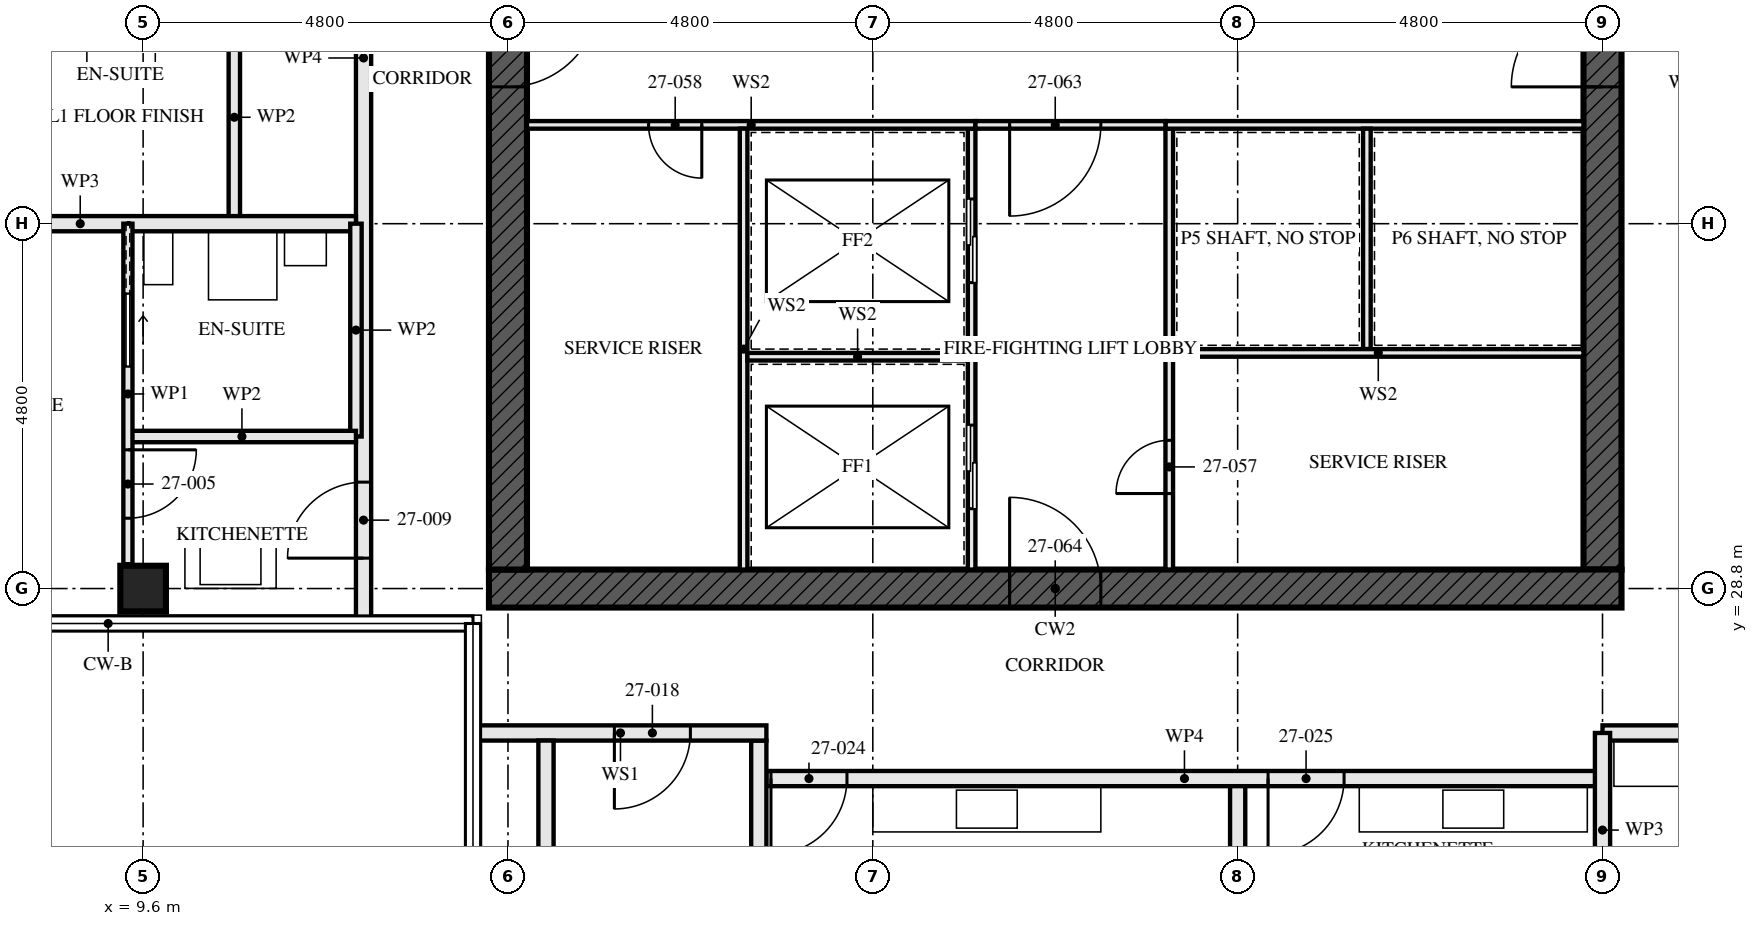
"""IFC4 building model, lengths in metres.
Left out: names, types, materials, properties, quantities, classifications, styles, units other than length and angle.
Written with IfcOpenShell. Run it as: python <this file> out.ifc"""

import sys

from ifc_helpers import new_model, si_unit, direction, frame, frame_2d, origin, origin_2d, place, context, subcontext, project, spatial, rectangle, hollow_rectangle, extrude, element, fill, save


model = new_model("IFC4")
c1 = context("Model", 3, precision=1e-05, world=origin(), true_north=direction((0.0, 1.0)))
c2 = subcontext(c1, "Body", "Model", "MODEL_VIEW")
j1 = project(units=[si_unit("LENGTHUNIT", "METRE"), si_unit("PLANEANGLEUNIT", "RADIAN")], contexts=[c1])
p1 = place(None, origin())
s1 = spatial("IfcSite", under=j1, at=p1, CompositionType="ELEMENT")
p2 = place(p1, origin())
s2 = spatial("IfcBuilding", under=s1, at=p2, CompositionType="ELEMENT")
p3 = place(p2, frame((0.0, 0.0, 101.5)))
s3 = spatial("IfcBuildingStorey", under=s2, at=p3, CompositionType="ELEMENT", Elevation=101.5)
p4 = place(p3, frame((9.6, 28.8, 0.0), z_axis=(0.0, 0.0, 1.0), x_axis=(0.0, 1.0, 0.0)))
e1 = element("IfcColumn", 1, at=p4, inside=s3, PredefinedType="COLUMN", context=c2, shape_type="SweptSolid", body=[
    extrude(hollow_rectangle(XDim=0.6, YDim=0.6, WallThickness=0.08, at=origin_2d()), origin(), (0.0, 0.0, 1.0), 3.5),
])
p5 = place(p3, frame((14.15, 28.8, -0.17), z_axis=(0.0, 0.0, 1.0), x_axis=(1.0, 0.0, 0.0)))
e2 = element("IfcWall", 2, at=p5, inside=s3, PredefinedType="SHEAR", context=c2, shape_type="SweptSolid", body=[
    extrude(rectangle(XDim=14.9, YDim=0.5, at=frame_2d((7.45, 0.0))), origin(), (0.0, 0.0, 1.0), 3.5),
])
p6 = place(p5, frame((6.85, 0.0, 0.17)))
e3 = element("IfcOpeningElement", 3, at=p6, cuts=e2, PredefinedType="OPENING", context=c2, shape_type="SweptSolid", body=[
    extrude(rectangle(XDim=1.2, YDim=2.1, at=frame_2d((0.6, 1.05))), frame((0.0, 0.26, 0.0), z_axis=(0.0, -1.0, 0.0), x_axis=(1.0, 0.0, 0.0)), (0.0, 0.0, 1.0), 0.521),
])
p7 = place(p3, frame((14.4, 42.95, -0.17), z_axis=(0.0, 0.0, 1.0), x_axis=(0.0, -1.0, 0.0)))
e4 = element("IfcWall", 4, at=p7, inside=s3, PredefinedType="SHEAR", context=c2, shape_type="SweptSolid", body=[
    extrude(rectangle(XDim=13.9, YDim=0.5, at=frame_2d((6.95, 0.0))), origin(), (0.0, 0.0, 1.0), 3.5),
])
p8 = place(p7, frame((6.35, 0.0, 0.17)))
e5 = element("IfcOpeningElement", 5, at=p8, cuts=e4, PredefinedType="OPENING", context=c2, shape_type="SweptSolid", body=[
    extrude(rectangle(XDim=1.2, YDim=2.1, at=frame_2d((0.6, 1.05))), frame((0.0, 0.26, 0.0), z_axis=(0.0, -1.0, 0.0), x_axis=(1.0, 0.0, 0.0)), (0.0, 0.0, 1.0), 0.521),
])
p9 = place(p3, frame((28.8, 29.05, -0.17), z_axis=(0.0, 0.0, 1.0), x_axis=(0.0, 1.0, 0.0)))
e6 = element("IfcWall", 6, at=p9, inside=s3, PredefinedType="SHEAR", context=c2, shape_type="SweptSolid", body=[
    extrude(rectangle(XDim=13.9, YDim=0.5, at=frame_2d((6.95, 0.0))), origin(), (0.0, 0.0, 1.0), 3.5),
])
p10 = place(p9, frame((6.35, 0.0, 0.17)))
e7 = element("IfcOpeningElement", 7, at=p10, cuts=e6, PredefinedType="OPENING", context=c2, shape_type="SweptSolid", body=[
    extrude(rectangle(XDim=1.2, YDim=2.1, at=frame_2d((0.6, 1.05))), frame((0.0, 0.26, 0.0), z_axis=(0.0, -1.0, 0.0), x_axis=(1.0, 0.0, 0.0)), (0.0, 0.0, 1.0), 0.521),
])
p11 = place(p3, frame((10.8, 36.4, 0.0), z_axis=(0.0, 0.0, 1.0), x_axis=(0.0, -1.0, 0.0)))
e8 = element("IfcWall", 8, at=p11, inside=s3, PredefinedType="PARTITIONING", context=c2, shape_type="SweptSolid", body=[
    extrude(rectangle(XDim=2.8, YDim=0.15, at=frame_2d((1.4, 0.0))), origin(), (0.0, 0.0, 1.0), 3.33),
])
p12 = place(p3, frame((5.145, 33.6, 0.0), z_axis=(0.0, 0.0, 1.0), x_axis=(1.0, 0.0, 0.0)))
e9 = element("IfcWall", 9, at=p12, inside=s3, PredefinedType="PARTITIONING", context=c2, shape_type="SweptSolid", body=[
    extrude(rectangle(XDim=7.255, YDim=0.2, at=frame_2d((3.627, 0.0))), origin(), (0.0, 0.0, 1.0), 2.55),
])
p13 = place(p3, frame((9.4, 30.8, 0.0), z_axis=(0.0, 0.0, 1.0), x_axis=(1.0, 0.0, 0.0)))
e10 = element("IfcWall", 10, at=p13, inside=s3, PredefinedType="PARTITIONING", context=c2, shape_type="SweptSolid", body=[
    extrude(rectangle(XDim=3.0, YDim=0.15, at=frame_2d((1.5, 0.0))), origin(), (0.0, 0.0, 1.0), 3.33),
])
p14 = place(p3, frame((12.4, 33.6, 0.0), z_axis=(0.0, 0.0, 1.0), x_axis=(0.0, -1.0, 0.0)))
e11 = element("IfcWall", 11, at=p14, inside=s3, PredefinedType="PARTITIONING", context=c2, shape_type="SweptSolid", body=[
    extrude(rectangle(XDim=2.8, YDim=0.15, at=frame_2d((1.4, 0.0))), origin(), (0.0, 0.0, 1.0), 3.33),
])
p15 = place(p3, frame((9.4, 33.6, 0.0), z_axis=(0.0, 0.0, 1.0), x_axis=(0.0, -1.0, 0.0)))
e12 = element("IfcWall", 12, at=p15, inside=s3, PredefinedType="PARTITIONING", context=c2, shape_type="SweptSolid", body=[
    extrude(rectangle(XDim=4.48, YDim=0.12, at=frame_2d((2.24, 0.0))), origin(), (0.0, 0.0, 1.0), 3.33),
])
p16 = place(p15, frame((2.975, 0.0, 0.0)))
e13 = element("IfcOpeningElement", 13, at=p16, cuts=e12, PredefinedType="OPENING", context=c2, shape_type="SweptSolid", body=[
    extrude(rectangle(XDim=0.9, YDim=2.1, at=frame_2d((0.45, 1.05))), frame((0.0, 0.071, 0.0), z_axis=(0.0, -1.0, 0.0), x_axis=(1.0, 0.0, 0.0)), (0.0, 0.0, 1.0), 0.141),
])
p17 = place(p15, frame((0.925, 0.0, 0.0)))
e14 = element("IfcOpeningElement", 14, at=p17, cuts=e12, PredefinedType="OPENING", context=c2, shape_type="SweptSolid", body=[
    extrude(rectangle(XDim=0.95, YDim=2.1, at=frame_2d((0.475, 1.05))), frame((0.0, 0.071, 0.0), z_axis=(0.0, -1.0, 0.0), x_axis=(1.0, 0.0, 0.0)), (0.0, 0.0, 1.0), 0.141),
])
p18 = place(p3, frame((12.5, 43.2, 0.0), z_axis=(0.0, 0.0, 1.0), x_axis=(0.0, -1.0, 0.0)))
e15 = element("IfcWall", 15, at=p18, inside=s3, PredefinedType="PARTITIONING", context=c2, shape_type="SweptSolid", body=[
    extrude(rectangle(XDim=14.84, YDim=0.2, at=frame_2d((7.42, 0.0))), origin(), (0.0, 0.0, 1.0), 2.32),
])
p19 = place(p18, frame((1.4, 0.0, 0.0)))
e16 = element("IfcOpeningElement", 16, at=p19, cuts=e15, PredefinedType="OPENING", context=c2, shape_type="SweptSolid", body=[
    extrude(rectangle(XDim=1.0, YDim=2.1, at=frame_2d((0.5, 1.05))), frame((0.0, 0.111, 0.0), z_axis=(0.0, -1.0, 0.0), x_axis=(1.0, 0.0, 0.0)), (0.0, 0.0, 1.0), 0.221),
])
p20 = place(p18, frame((5.2, 0.0, 0.0)))
e17 = element("IfcOpeningElement", 17, at=p20, cuts=e15, PredefinedType="OPENING", context=c2, shape_type="SweptSolid", body=[
    extrude(rectangle(XDim=1.0, YDim=2.1, at=frame_2d((0.5, 1.05))), frame((0.0, 0.111, 0.0), z_axis=(0.0, -1.0, 0.0), x_axis=(1.0, 0.0, 0.0)), (0.0, 0.0, 1.0), 0.221),
])
p21 = place(p18, frame((13.0, 0.0, 0.0)))
e18 = element("IfcOpeningElement", 18, at=p21, cuts=e15, PredefinedType="OPENING", context=c2, shape_type="SweptSolid", body=[
    extrude(rectangle(XDim=1.0, YDim=2.1, at=frame_2d((0.5, 1.05))), frame((0.0, 0.111, 0.0), z_axis=(0.0, -1.0, 0.0), x_axis=(1.0, 0.0, 0.0)), (0.0, 0.0, 1.0), 0.221),
])
for number, where, z_axis, x_axis in (
    (19, (14.9, 22.1, 0.0), (0.0, 0.0, 1.0), (0.0, 1.0, 0.0)),
    (20, (17.7, 22.1, 0.0), (0.0, 0.0, 1.0), (0.0, 1.0, 0.0)),
):
    element("IfcWall", number, at=place(p3, frame(where, z_axis=z_axis, x_axis=x_axis)), inside=s3, PredefinedType="SOLIDWALL", context=c2, shape_type="SweptSolid", body=[
        extrude(rectangle(XDim=4.7, YDim=0.2, at=frame_2d((2.35, 0.0))), origin(), (0.0, 0.0, 1.0), 2.99),
    ])
p22 = place(p3, frame((13.96, 26.9, 0.0), z_axis=(0.0, 0.0, 1.0), x_axis=(1.0, 0.0, 0.0)))
e21 = element("IfcWall", 21, at=p22, inside=s3, PredefinedType="SOLIDWALL", context=c2, shape_type="SweptSolid", body=[
    extrude(rectangle(XDim=3.84, YDim=0.2, at=frame_2d((1.92, 0.0))), origin(), (0.0, 0.0, 1.0), 2.32),
])
p23 = place(p22, frame((1.84, 0.0, 0.0)))
e22 = element("IfcOpeningElement", 22, at=p23, cuts=e21, PredefinedType="OPENING", context=c2, shape_type="SweptSolid", body=[
    extrude(rectangle(XDim=1.0, YDim=2.1, at=frame_2d((0.5, 1.05))), frame((0.0, 0.111, 0.0), z_axis=(0.0, -1.0, 0.0), x_axis=(1.0, 0.0, 0.0)), (0.0, 0.0, 1.0), 0.221),
])
p24 = place(p3, frame((24.0, 14.745, 0.0), z_axis=(0.0, 0.0, 1.0), x_axis=(0.0, 1.0, 0.0)))
e23 = element("IfcWall", 23, at=p24, inside=s3, PredefinedType="PARTITIONING", context=c2, shape_type="SweptSolid", body=[
    extrude(rectangle(XDim=11.455, YDim=0.2, at=frame_2d((5.728, 0.0))), origin(), (0.0, 0.0, 1.0), 2.55),
])
p25 = place(p3, frame((17.8, 26.3, 0.0), z_axis=(0.0, 0.0, 1.0), x_axis=(1.0, 0.0, 0.0)))
e24 = element("IfcWall", 24, at=p25, inside=s3, PredefinedType="PARTITIONING", context=c2, shape_type="SweptSolid", body=[
    extrude(rectangle(XDim=11.0, YDim=0.2, at=frame_2d((5.5, 0.0))), origin(), (0.0, 0.0, 1.0), 2.55),
])
p26 = place(p25, frame((0.06, 0.0, 0.0)))
e25 = element("IfcOpeningElement", 25, at=p26, cuts=e24, PredefinedType="OPENING", context=c2, shape_type="SweptSolid", body=[
    extrude(rectangle(XDim=1.0, YDim=2.1, at=frame_2d((0.5, 1.05))), frame((0.0, 0.111, 0.0), z_axis=(0.0, -1.0, 0.0), x_axis=(1.0, 0.0, 0.0)), (0.0, 0.0, 1.0), 0.221),
])
p27 = place(p25, frame((6.6, 0.0, 0.0)))
e26 = element("IfcOpeningElement", 26, at=p27, cuts=e24, PredefinedType="OPENING", context=c2, shape_type="SweptSolid", body=[
    extrude(rectangle(XDim=1.0, YDim=2.1, at=frame_2d((0.5, 1.05))), frame((0.0, 0.111, 0.0), z_axis=(0.0, -1.0, 0.0), x_axis=(1.0, 0.0, 0.0)), (0.0, 0.0, 1.0), 0.221),
])
p28 = place(p3, frame((28.8, 26.9, 0.0), z_axis=(0.0, 0.0, 1.0), x_axis=(1.0, 0.0, 0.0)))
e27 = element("IfcWall", 27, at=p28, inside=s3, PredefinedType="PARTITIONING", context=c2, shape_type="SweptSolid", body=[
    extrude(rectangle(XDim=9.6, YDim=0.2, at=frame_2d((4.8, 0.0))), origin(), (0.0, 0.0, 1.0), 3.33),
])
p29 = place(p28, frame((5.2, 0.0, 0.0)))
e28 = element("IfcOpeningElement", 28, at=p29, cuts=e27, PredefinedType="OPENING", context=c2, shape_type="SweptSolid", body=[
    extrude(rectangle(XDim=1.0, YDim=2.1, at=frame_2d((0.5, 1.05))), frame((0.0, 0.111, 0.0), z_axis=(0.0, -1.0, 0.0), x_axis=(1.0, 0.0, 0.0)), (0.0, 0.0, 1.0), 0.221),
])
p30 = place(p3, frame((20.5, 29.05, 0.0), z_axis=(0.0, 0.0, 1.0), x_axis=(0.0, 1.0, 0.0)))
e29 = element("IfcWall", 29, at=p30, inside=s3, PredefinedType="SOLIDWALL", context=c2, shape_type="SweptSolid", body=[
    extrude(rectangle(XDim=5.8, YDim=0.1, at=frame_2d((2.9, 0.0))), origin(), (0.0, 0.0, 1.0), 3.33),
])
p31 = place(p30, frame((0.8, 0.0, 0.0)))
e30 = element("IfcOpeningElement", 30, at=p31, cuts=e29, PredefinedType="OPENING", context=c2, shape_type="SweptSolid", body=[
    extrude(rectangle(XDim=1.1, YDim=2.3, at=frame_2d((0.55, 1.15))), frame((0.0, 0.061, 0.0), z_axis=(0.0, -1.0, 0.0), x_axis=(1.0, 0.0, 0.0)), (0.0, 0.0, 1.0), 0.121),
])
p32 = place(p30, frame((3.775, 0.0, 0.0)))
e31 = element("IfcOpeningElement", 31, at=p32, cuts=e29, PredefinedType="OPENING", context=c2, shape_type="SweptSolid", body=[
    extrude(rectangle(XDim=1.1, YDim=2.3, at=frame_2d((0.55, 1.15))), frame((0.0, 0.061, 0.0), z_axis=(0.0, -1.0, 0.0), x_axis=(1.0, 0.0, 0.0)), (0.0, 0.0, 1.0), 0.121),
])
p33 = place(p3, frame((23.1, 29.05, 0.0), z_axis=(0.0, 0.0, 1.0), x_axis=(0.0, 1.0, 0.0)))
e32 = element("IfcWall", 32, at=p33, inside=s3, PredefinedType="SOLIDWALL", context=c2, shape_type="SweptSolid", body=[
    extrude(rectangle(XDim=5.8, YDim=0.1, at=frame_2d((2.9, 0.0))), origin(), (0.0, 0.0, 1.0), 3.33),
])
p34 = place(p33, frame((1.0, 0.0, 0.0)))
e33 = element("IfcOpeningElement", 33, at=p34, cuts=e32, PredefinedType="OPENING", context=c2, shape_type="SweptSolid", body=[
    extrude(rectangle(XDim=0.7, YDim=2.1, at=frame_2d((0.35, 1.05))), frame((0.0, 0.061, 0.0), z_axis=(0.0, -1.0, 0.0), x_axis=(1.0, 0.0, 0.0)), (0.0, 0.0, 1.0), 0.121),
])
p35 = place(p3, frame((14.65, 34.9, 0.0), z_axis=(0.0, 0.0, 1.0), x_axis=(1.0, 0.0, 0.0)))
e34 = element("IfcWall", 34, at=p35, inside=s3, PredefinedType="SOLIDWALL", context=c2, shape_type="SweptSolid", body=[
    extrude(rectangle(XDim=5.9, YDim=0.1, at=frame_2d((2.95, 0.0))), origin(), (0.0, 0.0, 1.0), 3.33),
])
p36 = place(p35, frame((1.6, 0.0, 0.0)))
e35 = element("IfcOpeningElement", 35, at=p36, cuts=e34, PredefinedType="OPENING", context=c2, shape_type="SweptSolid", body=[
    extrude(rectangle(XDim=0.7, YDim=2.1, at=frame_2d((0.35, 1.05))), frame((0.0, 0.061, 0.0), z_axis=(0.0, -1.0, 0.0), x_axis=(1.0, 0.0, 0.0)), (0.0, 0.0, 1.0), 0.121),
])
p37 = place(p3, frame((23.05, 34.9, 0.0), z_axis=(0.0, 0.0, 1.0), x_axis=(1.0, 0.0, 0.0)))
e36 = element("IfcWall", 36, at=p37, inside=s3, PredefinedType="SOLIDWALL", context=c2, shape_type="SweptSolid", body=[
    extrude(rectangle(XDim=5.5, YDim=0.1, at=frame_2d((2.75, 0.0))), origin(), (0.0, 0.0, 1.0), 3.33),
])
p38 = place(p3, frame((20.55, 34.9, 0.0), z_axis=(0.0, 0.0, 1.0), x_axis=(1.0, 0.0, 0.0)))
e37 = element("IfcWall", 37, at=p38, inside=s3, PredefinedType="SOLIDWALL", context=c2, shape_type="SweptSolid", body=[
    extrude(rectangle(XDim=2.5, YDim=0.1, at=frame_2d((1.25, 0.0))), origin(), (0.0, 0.0, 1.0), 3.33),
])
p39 = place(p38, frame((0.45, 0.0, 0.0)))
e38 = element("IfcOpeningElement", 38, at=p39, cuts=e37, PredefinedType="OPENING", context=c2, shape_type="SweptSolid", body=[
    extrude(rectangle(XDim=1.2, YDim=2.1, at=frame_2d((0.6, 1.05))), frame((0.0, 0.061, 0.0), z_axis=(0.0, -1.0, 0.0), x_axis=(1.0, 0.0, 0.0)), (0.0, 0.0, 1.0), 0.121),
])
p40 = place(p3, frame((17.5, 29.05, 0.0), z_axis=(0.0, 0.0, 1.0), x_axis=(0.0, 1.0, 0.0)))
e39 = element("IfcWall", 39, at=p40, inside=s3, PredefinedType="SOLIDWALL", context=c2, shape_type="SweptSolid", body=[
    extrude(rectangle(XDim=5.8, YDim=0.1, at=frame_2d((2.9, 0.0))), origin(), (0.0, 0.0, 1.0), 3.33),
])
p41 = place(p3, frame((17.55, 31.85, 0.0), z_axis=(0.0, 0.0, 1.0), x_axis=(1.0, 0.0, 0.0)))
e40 = element("IfcWall", 40, at=p41, inside=s3, PredefinedType="SOLIDWALL", context=c2, shape_type="SweptSolid", body=[
    extrude(rectangle(XDim=2.9, YDim=0.1, at=frame_2d((1.45, 0.0))), origin(), (0.0, 0.0, 1.0), 3.33),
])
p42 = place(p3, frame((25.7, 31.95, 0.0), z_axis=(0.0, 0.0, 1.0), x_axis=(0.0, 1.0, 0.0)))
e41 = element("IfcWall", 41, at=p42, inside=s3, PredefinedType="SOLIDWALL", context=c2, shape_type="SweptSolid", body=[
    extrude(rectangle(XDim=2.9, YDim=0.1, at=frame_2d((1.45, 0.0))), origin(), (0.0, 0.0, 1.0), 3.33),
])
p43 = place(p3, frame((23.15, 31.9, 0.0), z_axis=(0.0, 0.0, 1.0), x_axis=(1.0, 0.0, 0.0)))
e42 = element("IfcWall", 42, at=p43, inside=s3, PredefinedType="SOLIDWALL", context=c2, shape_type="SweptSolid", body=[
    extrude(rectangle(XDim=5.4, YDim=0.1, at=frame_2d((2.7, 0.0))), origin(), (0.0, 0.0, 1.0), 3.33),
])
p44 = place(p3, frame((28.8, 24.345, 0.0), z_axis=(0.0, 0.0, 1.0), x_axis=(0.0, 1.0, 0.0)))
e43 = element("IfcWall", 43, at=p44, inside=s3, PredefinedType="PARTITIONING", context=c2, shape_type="SweptSolid", body=[
    extrude(rectangle(XDim=2.555, YDim=0.2, at=frame_2d((1.277, 0.0))), origin(), (0.0, 0.0, 1.0), 2.32),
])
p45 = place(p16, origin())
e44 = element("IfcDoor", 44, at=p45, inside=s3, OperationType="SINGLE_SWING_RIGHT", PredefinedType="DOOR", context=c2, shape_type="SweptSolid", body=[
    extrude(rectangle(XDim=0.9, YDim=2.1, at=frame_2d((0.45, 1.05))), frame((0.0, 0.022, 0.0), z_axis=(0.0, -1.0, 0.0), x_axis=(1.0, 0.0, 0.0)), (0.0, 0.0, 1.0), 0.044),
])
fill(e13, e44)
p46 = place(p17, origin())
e45 = element("IfcDoor", 45, at=p46, inside=s3, OperationType="SLIDING_TO_RIGHT", PredefinedType="DOOR", context=c2, shape_type="SweptSolid", body=[
    extrude(rectangle(XDim=0.95, YDim=2.1, at=frame_2d((0.475, 1.05))), frame((0.0, 0.022, 0.0), z_axis=(0.0, -1.0, 0.0), x_axis=(1.0, 0.0, 0.0)), (0.0, 0.0, 1.0), 0.044),
])
fill(e14, e45)
p47 = place(p21, frame((1.0, 0.0, 0.0), z_axis=(0.0, 0.0, 1.0), x_axis=(-1.0, 0.0, 0.0)))
e46 = element("IfcDoor", 46, at=p47, inside=s3, OperationType="SINGLE_SWING_RIGHT", PredefinedType="DOOR", context=c2, shape_type="SweptSolid", body=[
    extrude(rectangle(XDim=1.0, YDim=2.1, at=frame_2d((0.5, 1.05))), frame((0.0, 0.027, 0.0), z_axis=(0.0, -1.0, 0.0), x_axis=(1.0, 0.0, 0.0)), (0.0, 0.0, 1.0), 0.054),
])
fill(e18, e46)
p48 = place(p23, frame((1.0, 0.0, 0.0), z_axis=(0.0, 0.0, 1.0), x_axis=(-1.0, 0.0, 0.0)))
e47 = element("IfcDoor", 47, at=p48, inside=s3, OperationType="SINGLE_SWING_LEFT", PredefinedType="DOOR", context=c2, shape_type="SweptSolid", body=[
    extrude(rectangle(XDim=1.0, YDim=2.1, at=frame_2d((0.5, 1.05))), frame((0.0, 0.032, 0.0), z_axis=(0.0, -1.0, 0.0), x_axis=(1.0, 0.0, 0.0)), (0.0, 0.0, 1.0), 0.064),
])
fill(e22, e47)
p49 = place(p26, frame((1.0, 0.0, 0.0), z_axis=(0.0, 0.0, 1.0), x_axis=(-1.0, 0.0, 0.0)))
e48 = element("IfcDoor", 48, at=p49, inside=s3, OperationType="SINGLE_SWING_LEFT", PredefinedType="DOOR", context=c2, shape_type="SweptSolid", body=[
    extrude(rectangle(XDim=1.0, YDim=2.1, at=frame_2d((0.5, 1.05))), frame((0.0, 0.027, 0.0), z_axis=(0.0, -1.0, 0.0), x_axis=(1.0, 0.0, 0.0)), (0.0, 0.0, 1.0), 0.054),
])
fill(e25, e48)
p50 = place(p27, frame((1.0, 0.0, 0.0), z_axis=(0.0, 0.0, 1.0), x_axis=(-1.0, 0.0, 0.0)))
e49 = element("IfcDoor", 49, at=p50, inside=s3, OperationType="SINGLE_SWING_LEFT", PredefinedType="DOOR", context=c2, shape_type="SweptSolid", body=[
    extrude(rectangle(XDim=1.0, YDim=2.1, at=frame_2d((0.5, 1.05))), frame((0.0, 0.027, 0.0), z_axis=(0.0, -1.0, 0.0), x_axis=(1.0, 0.0, 0.0)), (0.0, 0.0, 1.0), 0.054),
])
fill(e26, e49)
p51 = place(p31, origin())
e50 = element("IfcDoor", 50, at=p51, inside=s3, OperationType="SLIDING_TO_LEFT", PredefinedType="DOOR", context=c2, shape_type="SweptSolid", body=[
    extrude(rectangle(XDim=1.1, YDim=2.3, at=frame_2d((0.55, 1.15))), frame((0.0, 0.05, 0.0), z_axis=(0.0, -1.0, 0.0), x_axis=(1.0, 0.0, 0.0)), (0.0, 0.0, 1.0), 0.1),
])
fill(e30, e50)
p52 = place(p32, origin())
e51 = element("IfcDoor", 51, at=p52, inside=s3, OperationType="SLIDING_TO_LEFT", PredefinedType="DOOR", context=c2, shape_type="SweptSolid", body=[
    extrude(rectangle(XDim=1.1, YDim=2.3, at=frame_2d((0.55, 1.15))), frame((0.0, 0.05, 0.0), z_axis=(0.0, -1.0, 0.0), x_axis=(1.0, 0.0, 0.0)), (0.0, 0.0, 1.0), 0.1),
])
fill(e31, e51)
p53 = place(p34, origin())
e52 = element("IfcDoor", 52, at=p53, inside=s3, OperationType="SINGLE_SWING_RIGHT", PredefinedType="DOOR", context=c2, shape_type="SweptSolid", body=[
    extrude(rectangle(XDim=0.7, YDim=2.1, at=frame_2d((0.35, 1.05))), frame((0.0, 0.027, 0.0), z_axis=(0.0, -1.0, 0.0), x_axis=(1.0, 0.0, 0.0)), (0.0, 0.0, 1.0), 0.054),
])
fill(e33, e52)
p54 = place(p36, frame((0.7, 0.0, 0.0), z_axis=(0.0, 0.0, 1.0), x_axis=(-1.0, 0.0, 0.0)))
e53 = element("IfcDoor", 53, at=p54, inside=s3, OperationType="SINGLE_SWING_RIGHT", PredefinedType="DOOR", context=c2, shape_type="SweptSolid", body=[
    extrude(rectangle(XDim=0.7, YDim=2.1, at=frame_2d((0.35, 1.05))), frame((0.0, 0.027, 0.0), z_axis=(0.0, -1.0, 0.0), x_axis=(1.0, 0.0, 0.0)), (0.0, 0.0, 1.0), 0.054),
])
fill(e35, e53)
p55 = place(p39, frame((1.2, 0.0, 0.0), z_axis=(0.0, 0.0, 1.0), x_axis=(-1.0, 0.0, 0.0)))
e54 = element("IfcDoor", 54, at=p55, inside=s3, OperationType="SINGLE_SWING_LEFT", PredefinedType="DOOR", context=c2, shape_type="SweptSolid", body=[
    extrude(rectangle(XDim=1.2, YDim=2.1, at=frame_2d((0.6, 1.05))), frame((0.0, 0.027, 0.0), z_axis=(0.0, -1.0, 0.0), x_axis=(1.0, 0.0, 0.0)), (0.0, 0.0, 1.0), 0.054),
])
fill(e38, e54)
p56 = place(p6, origin())
e55 = element("IfcDoor", 55, at=p56, inside=s3, OperationType="SINGLE_SWING_LEFT", PredefinedType="DOOR", context=c2, shape_type="SweptSolid", body=[
    extrude(rectangle(XDim=1.2, YDim=2.1, at=frame_2d((0.6, 1.05))), frame((0.0, 0.027, 0.0), z_axis=(0.0, -1.0, 0.0), x_axis=(1.0, 0.0, 0.0)), (0.0, 0.0, 1.0), 0.054),
])
fill(e3, e55)
p57 = place(p8, origin())
e56 = element("IfcDoor", 56, at=p57, inside=s3, OperationType="SINGLE_SWING_LEFT", PredefinedType="DOOR", context=c2, shape_type="SweptSolid", body=[
    extrude(rectangle(XDim=1.2, YDim=2.1, at=frame_2d((0.6, 1.05))), frame((0.0, 0.027, 0.0), z_axis=(0.0, -1.0, 0.0), x_axis=(1.0, 0.0, 0.0)), (0.0, 0.0, 1.0), 0.054),
])
fill(e5, e56)
p58 = place(p10, origin())
e57 = element("IfcDoor", 57, at=p58, inside=s3, OperationType="SINGLE_SWING_LEFT", PredefinedType="DOOR", context=c2, shape_type="SweptSolid", body=[
    extrude(rectangle(XDim=1.2, YDim=2.1, at=frame_2d((0.6, 1.05))), frame((0.0, 0.027, 0.0), z_axis=(0.0, -1.0, 0.0), x_axis=(1.0, 0.0, 0.0)), (0.0, 0.0, 1.0), 0.054),
])
fill(e7, e57)
save(model, sys.argv[1])
